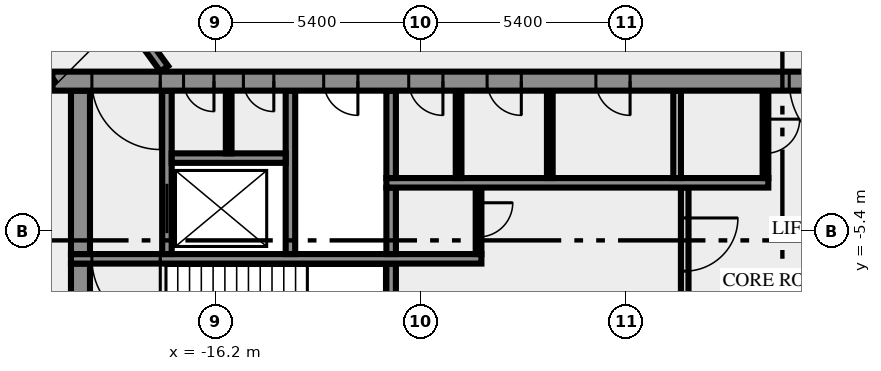
"""IFC4 building model, lengths in metres.
Left out: names, types, materials, properties, quantities, classifications, styles, units other than length and angle.
Written with IfcOpenShell. Run it as: python <this file> out.ifc"""

import sys

from ifc_helpers import new_model, si_unit, direction, frame, frame_2d, origin, place, context, subcontext, project, spatial, rectangle, extrude, element, fill, save


model = new_model("IFC4")
c1 = context("Model", 3, precision=1e-05, world=origin(), true_north=direction((0.0, 1.0)))
c2 = subcontext(c1, "Body", "Model", "MODEL_VIEW")
j1 = project(units=[si_unit("LENGTHUNIT", "METRE"), si_unit("PLANEANGLEUNIT", "RADIAN")], contexts=[c1])
p1 = place(None, origin())
s1 = spatial("IfcSite", under=j1, at=p1, CompositionType="ELEMENT")
p2 = place(p1, origin())
s2 = spatial("IfcBuilding", under=s1, at=p2, CompositionType="ELEMENT")
p3 = place(p2, frame((0.0, 0.0, 206.0)))
s3 = spatial("IfcBuildingStorey", under=s2, at=p3, CompositionType="ELEMENT", Elevation=206.0)
p4 = place(p3, frame((-19.75, -10.5, 0.0), z_axis=(0.0, 0.0, 1.0), x_axis=(0.0, 1.0, 0.0)))
e1 = element("IfcWall", 1, at=p4, inside=s3, PredefinedType="SHEAR", context=c2, shape_type="SweptSolid", body=[
    extrude(rectangle(XDim=4.25, YDim=0.5, at=frame_2d((2.125, 0.0))), origin(), (0.0, 0.0, 1.0), 3.65),
])
p5 = place(p3, frame((-11.575, -7.25, 0.0), z_axis=(0.0, 0.0, 1.0), x_axis=(0.0, 1.0, 0.0)))
e2 = element("IfcWall", 2, at=p5, inside=s3, PredefinedType="SHEAR", context=c2, shape_type="SweptSolid", body=[
    extrude(rectangle(XDim=1.0, YDim=0.25, at=frame_2d((0.5, 0.0))), origin(), (0.0, 0.0, 1.0), 3.65),
])
p6 = place(p3, frame((-3.85, -4.25, 0.0), z_axis=(0.0, 0.0, 1.0), x_axis=(0.0, -1.0, 0.0)))
e3 = element("IfcWall", 3, at=p6, inside=s3, PredefinedType="SOLIDWALL", context=c2, shape_type="SweptSolid", body=[
    extrude(rectangle(XDim=3.0, YDim=0.2, at=frame_2d((1.5, 0.0))), origin(), (0.0, 0.0, 1.0), 3.65),
])
p7 = place(p6, frame((0.8, 0.0, 0.0)))
e4 = element("IfcOpeningElement", 4, at=p7, cuts=e3, PredefinedType="OPENING", context=c2, shape_type="SweptSolid", body=[
    extrude(rectangle(XDim=1.4, YDim=2.1, at=frame_2d((0.7, 1.05))), frame((0.0, 0.11, 0.0), z_axis=(0.0, -1.0, 0.0), x_axis=(1.0, 0.0, 0.0)), (0.0, 0.0, 1.0), 0.22),
])
p8 = place(p3, frame((-9.2, -6.125, 0.0), z_axis=(0.0, 0.0, 1.0), x_axis=(-1.0, 0.0, 0.0)))
e5 = element("IfcWall", 5, at=p8, inside=s3, PredefinedType="SHEAR", context=c2, shape_type="SweptSolid", body=[
    extrude(rectangle(XDim=10.8, YDim=0.25, at=frame_2d((5.4, 0.0))), origin(), (0.0, 0.0, 1.0), 3.65),
])
p9 = place(p8, frame((8.45, 0.0, 0.0)))
e6 = element("IfcOpeningElement", 6, at=p9, cuts=e5, PredefinedType="OPENING", context=c2, shape_type="SweptSolid", body=[
    extrude(rectangle(XDim=1.8, YDim=2.1, at=frame_2d((0.9, 1.05))), frame((0.0, 0.135, 0.0), z_axis=(0.0, -1.0, 0.0), x_axis=(1.0, 0.0, 0.0)), (0.0, 0.0, 1.0), 0.27),
])
p10 = place(p3, frame((-19.75, -6.0, 0.0), z_axis=(0.0, 0.0, 1.0), x_axis=(0.0, 1.0, 0.0)))
e7 = element("IfcWall", 7, at=p10, inside=s3, PredefinedType="SHEAR", context=c2, shape_type="SweptSolid", body=[
    extrude(rectangle(XDim=4.3, YDim=0.5, at=frame_2d((2.15, 0.0))), origin(), (0.0, 0.0, 1.0), 3.65),
])
p11 = place(p3, frame((-17.475, -6.0, 0.0), z_axis=(0.0, 0.0, 1.0), x_axis=(0.0, 1.0, 0.0)))
e8 = element("IfcWall", 8, at=p11, inside=s3, PredefinedType="SHEAR", context=c2, shape_type="SweptSolid", body=[
    extrude(rectangle(XDim=4.3, YDim=0.25, at=frame_2d((2.15, 0.0))), origin(), (0.0, 0.0, 1.0), 3.65),
])
p12 = place(p11, frame((0.55, 0.0, 0.0)))
e9 = element("IfcOpeningElement", 9, at=p12, cuts=e8, PredefinedType="OPENING", context=c2, shape_type="SweptSolid", body=[
    extrude(rectangle(XDim=1.3, YDim=2.1, at=frame_2d((0.65, 1.05))), frame((0.0, 0.135, 0.0), z_axis=(0.0, -1.0, 0.0), x_axis=(1.0, 0.0, 0.0)), (0.0, 0.0, 1.0), 0.27),
])
p13 = place(p3, frame((-14.225, -6.0, 0.0), z_axis=(0.0, 0.0, 1.0), x_axis=(0.0, 1.0, 0.0)))
e10 = element("IfcWall", 10, at=p13, inside=s3, PredefinedType="SHEAR", context=c2, shape_type="SweptSolid", body=[
    extrude(rectangle(XDim=4.3, YDim=0.25, at=frame_2d((2.15, 0.0))), origin(), (0.0, 0.0, 1.0), 3.65),
])
p14 = place(p3, frame((-11.575, -6.0, 0.0), z_axis=(0.0, 0.0, 1.0), x_axis=(0.0, 1.0, 0.0)))
e11 = element("IfcWall", 11, at=p14, inside=s3, PredefinedType="SHEAR", context=c2, shape_type="SweptSolid", body=[
    extrude(rectangle(XDim=1.75, YDim=0.25, at=frame_2d((0.875, 0.0))), origin(), (0.0, 0.0, 1.0), 3.65),
])
p15 = place(p3, frame((-9.275, -4.25, 0.0), z_axis=(0.0, 0.0, 1.0), x_axis=(0.0, -1.0, 0.0)))
e12 = element("IfcWall", 12, at=p15, inside=s3, PredefinedType="PARTITIONING", context=c2, shape_type="SweptSolid", body=[
    extrude(rectangle(XDim=1.75, YDim=0.15, at=frame_2d((0.875, 0.0))), origin(), (0.0, 0.0, 1.0), 3.65),
])
p16 = place(p15, frame((0.4, 0.0, 0.0)))
e13 = element("IfcOpeningElement", 13, at=p16, cuts=e12, PredefinedType="OPENING", context=c2, shape_type="SweptSolid", body=[
    extrude(rectangle(XDim=0.9, YDim=2.1, at=frame_2d((0.45, 1.05))), frame((0.0, 0.085, 0.0), z_axis=(0.0, -1.0, 0.0), x_axis=(1.0, 0.0, 0.0)), (0.0, 0.0, 1.0), 0.17),
])
p17 = place(p3, frame((-11.7, -4.125, 0.0), z_axis=(0.0, 0.0, 1.0), x_axis=(1.0, 0.0, 0.0)))
e14 = element("IfcWall", 14, at=p17, inside=s3, PredefinedType="SHEAR", context=c2, shape_type="SweptSolid", body=[
    extrude(rectangle(XDim=10.05, YDim=0.25, at=frame_2d((5.025, 0.0))), origin(), (0.0, 0.0, 1.0), 3.65),
])
p18 = place(p3, frame((-11.575, -4.0, 0.0), z_axis=(0.0, 0.0, 1.0), x_axis=(0.0, 1.0, 0.0)))
e15 = element("IfcWall", 15, at=p18, inside=s3, PredefinedType="SHEAR", context=c2, shape_type="SweptSolid", body=[
    extrude(rectangle(XDim=2.3, YDim=0.25, at=frame_2d((1.15, 0.0))), origin(), (0.0, 0.0, 1.0), 3.65),
])
for number, where, z_axis, x_axis in (
    (16, (-9.8, -4.0, 0.0), (0.0, 0.0, 1.0), (0.0, 1.0, 0.0)),
    (17, (-7.4, -4.0, 0.0), (0.0, 0.0, 1.0), (0.0, 1.0, 0.0)),
):
    element("IfcWall", number, at=place(p3, frame(where, z_axis=z_axis, x_axis=x_axis)), inside=s3, PredefinedType="PARTITIONING", context=c2, shape_type="SweptSolid", body=[
        extrude(rectangle(XDim=2.3, YDim=0.15, at=frame_2d((1.15, 0.0))), origin(), (0.0, 0.0, 1.0), 3.65),
    ])
p19 = place(p3, frame((-4.05, -4.0, 0.0), z_axis=(0.0, 0.0, 1.0), x_axis=(0.0, 1.0, 0.0)))
e18 = element("IfcWall", 18, at=p19, inside=s3, PredefinedType="SOLIDWALL", context=c2, shape_type="SweptSolid", body=[
    extrude(rectangle(XDim=2.3, YDim=0.2, at=frame_2d((1.15, 0.0))), origin(), (0.0, 0.0, 1.0), 3.65),
])
p20 = place(p3, frame((-1.725, -1.7, 0.0), z_axis=(0.0, 0.0, 1.0), x_axis=(0.0, -1.0, 0.0)))
e19 = element("IfcWall", 19, at=p20, inside=s3, PredefinedType="PARTITIONING", context=c2, shape_type="SweptSolid", body=[
    extrude(rectangle(XDim=2.3, YDim=0.15, at=frame_2d((1.15, 0.0))), origin(), (0.0, 0.0, 1.0), 3.65),
])
p21 = place(p20, frame((0.75, 0.0, 0.0)))
e20 = element("IfcOpeningElement", 20, at=p21, cuts=e19, PredefinedType="OPENING", context=c2, shape_type="SweptSolid", body=[
    extrude(rectangle(XDim=0.9, YDim=2.1, at=frame_2d((0.45, 1.05))), frame((0.0, 0.085, 0.0), z_axis=(0.0, -1.0, 0.0), x_axis=(1.0, 0.0, 0.0)), (0.0, 0.0, 1.0), 0.17),
])
p22 = place(p3, frame((-17.35, -3.475, 0.0), z_axis=(0.0, 0.0, 1.0), x_axis=(1.0, 0.0, 0.0)))
e21 = element("IfcWall", 21, at=p22, inside=s3, PredefinedType="SHEAR", context=c2, shape_type="SweptSolid", body=[
    extrude(rectangle(XDim=3.0, YDim=0.25, at=frame_2d((1.5, 0.0))), origin(), (0.0, 0.0, 1.0), 3.65),
])
p23 = place(p3, frame((-15.85, -3.35, 0.0), z_axis=(0.0, 0.0, 1.0), x_axis=(0.0, 1.0, 0.0)))
e22 = element("IfcWall", 22, at=p23, inside=s3, PredefinedType="PARTITIONING", context=c2, shape_type="SweptSolid", body=[
    extrude(rectangle(XDim=1.65, YDim=0.15, at=frame_2d((0.825, 0.0))), origin(), (0.0, 0.0, 1.0), 3.65),
])
p24 = place(p3, frame((20.49, -1.45, 0.0), z_axis=(0.0, 0.0, 1.0), x_axis=(-1.0, 0.0, 0.0)))
e23 = element("IfcWall", 23, at=p24, inside=s3, PredefinedType="SHEAR", context=c2, shape_type="SweptSolid", body=[
    extrude(rectangle(XDim=40.98, YDim=0.5, at=frame_2d((20.49, 0.0))), origin(), (0.0, 0.0, 1.0), 3.65),
])
p25 = place(p24, frame((38.14, 0.0, 0.0)))
e24 = element("IfcOpeningElement", 24, at=p25, cuts=e23, PredefinedType="OPENING", context=c2, shape_type="SweptSolid", body=[
    extrude(rectangle(XDim=1.8, YDim=2.1, at=frame_2d((0.9, 1.05))), frame((0.0, 0.26, 0.0), z_axis=(0.0, -1.0, 0.0), x_axis=(1.0, 0.0, 0.0)), (0.0, 0.0, 1.0), 0.52),
])
p26 = place(p24, frame((36.728, 0.0, 0.0)))
e25 = element("IfcOpeningElement", 25, at=p26, cuts=e23, PredefinedType="OPENING", context=c2, shape_type="SweptSolid", body=[
    extrude(rectangle(XDim=0.8, YDim=2.1, at=frame_2d((0.4, 1.05))), frame((0.0, 0.26, 0.0), z_axis=(0.0, -1.0, 0.0), x_axis=(1.0, 0.0, 0.0)), (0.0, 0.0, 1.0), 0.52),
])
p27 = place(p24, frame((35.153, 0.0, 0.0)))
e26 = element("IfcOpeningElement", 26, at=p27, cuts=e23, PredefinedType="OPENING", context=c2, shape_type="SweptSolid", body=[
    extrude(rectangle(XDim=0.8, YDim=2.1, at=frame_2d((0.4, 1.05))), frame((0.0, 0.26, 0.0), z_axis=(0.0, -1.0, 0.0), x_axis=(1.0, 0.0, 0.0)), (0.0, 0.0, 1.0), 0.52),
])
p28 = place(p24, frame((32.94, 0.0, 0.0)))
e27 = element("IfcOpeningElement", 27, at=p28, cuts=e23, PredefinedType="OPENING", context=c2, shape_type="SweptSolid", body=[
    extrude(rectangle(XDim=0.9, YDim=2.1, at=frame_2d((0.45, 1.05))), frame((0.0, 0.26, 0.0), z_axis=(0.0, -1.0, 0.0), x_axis=(1.0, 0.0, 0.0)), (0.0, 0.0, 1.0), 0.52),
])
p29 = place(p24, frame((30.702, 0.0, 0.0)))
e28 = element("IfcOpeningElement", 28, at=p29, cuts=e23, PredefinedType="OPENING", context=c2, shape_type="SweptSolid", body=[
    extrude(rectangle(XDim=0.9, YDim=2.1, at=frame_2d((0.45, 1.05))), frame((0.0, 0.26, 0.0), z_axis=(0.0, -1.0, 0.0), x_axis=(1.0, 0.0, 0.0)), (0.0, 0.0, 1.0), 0.52),
])
p30 = place(p24, frame((28.64, 0.0, 0.0)))
e29 = element("IfcOpeningElement", 29, at=p30, cuts=e23, PredefinedType="OPENING", context=c2, shape_type="SweptSolid", body=[
    extrude(rectangle(XDim=0.9, YDim=2.1, at=frame_2d((0.45, 1.05))), frame((0.0, 0.26, 0.0), z_axis=(0.0, -1.0, 0.0), x_axis=(1.0, 0.0, 0.0)), (0.0, 0.0, 1.0), 0.52),
])
p31 = place(p24, frame((25.778, 0.0, 0.0)))
e30 = element("IfcOpeningElement", 30, at=p31, cuts=e23, PredefinedType="OPENING", context=c2, shape_type="SweptSolid", body=[
    extrude(rectangle(XDim=0.9, YDim=2.1, at=frame_2d((0.45, 1.05))), frame((0.0, 0.26, 0.0), z_axis=(0.0, -1.0, 0.0), x_axis=(1.0, 0.0, 0.0)), (0.0, 0.0, 1.0), 0.52),
])
p32 = place(p24, frame((19.59, 0.0, 0.0)))
e31 = element("IfcOpeningElement", 31, at=p32, cuts=e23, PredefinedType="OPENING", context=c2, shape_type="SweptSolid", body=[
    extrude(rectangle(XDim=2.0, YDim=2.1, at=frame_2d((1.0, 1.05))), frame((0.0, 0.26, 0.0), z_axis=(0.0, -1.0, 0.0), x_axis=(1.0, 0.0, 0.0)), (0.0, 0.0, 1.0), 0.52),
])
p33 = place(p24, frame((7.14, 0.0, 0.0)))
e32 = element("IfcOpeningElement", 32, at=p33, cuts=e23, PredefinedType="OPENING", context=c2, shape_type="SweptSolid", body=[
    extrude(rectangle(XDim=0.9, YDim=2.1, at=frame_2d((0.45, 1.05))), frame((0.0, 0.26, 0.0), z_axis=(0.0, -1.0, 0.0), x_axis=(1.0, 0.0, 0.0)), (0.0, 0.0, 1.0), 0.52),
])
p34 = place(p24, frame((4.19, 0.0, 0.0)))
e33 = element("IfcOpeningElement", 33, at=p34, cuts=e23, PredefinedType="OPENING", context=c2, shape_type="SweptSolid", body=[
    extrude(rectangle(XDim=0.9, YDim=2.1, at=frame_2d((0.45, 1.05))), frame((0.0, 0.26, 0.0), z_axis=(0.0, -1.0, 0.0), x_axis=(1.0, 0.0, 0.0)), (0.0, 0.0, 1.0), 0.52),
])
p35 = place(p24, frame((1.04, 0.0, 0.0)))
e34 = element("IfcOpeningElement", 34, at=p35, cuts=e23, PredefinedType="OPENING", context=c2, shape_type="SweptSolid", body=[
    extrude(rectangle(XDim=1.8, YDim=2.1, at=frame_2d((0.9, 1.05))), frame((0.0, 0.26, 0.0), z_axis=(0.0, -1.0, 0.0), x_axis=(1.0, 0.0, 0.0)), (0.0, 0.0, 1.0), 0.52),
])
p36 = place(p3, frame((-20.531, -1.523, 0.0), z_axis=(0.0, 0.0, 1.0), x_axis=(-0.587784239999, 0.809017729849, 0.0)))
e35 = element("IfcWall", 35, at=p36, inside=s3, PredefinedType="SOLIDWALL", context=c2, shape_type="SweptSolid", body=[
    extrude(rectangle(XDim=23.271, YDim=0.25, at=frame_2d((11.635, 0.0))), origin(), (0.0, 0.0, 1.0), 3.65),
])
p37 = place(p36, frame((16.716, 0.0, 0.0)))
e36 = element("IfcOpeningElement", 36, at=p37, cuts=e35, PredefinedType="OPENING", context=c2, shape_type="SweptSolid", body=[
    extrude(rectangle(XDim=1.2, YDim=2.1, at=frame_2d((0.6, 1.05))), frame((0.0, 0.135, 0.0), z_axis=(0.0, -1.0, 0.0), x_axis=(1.0, 0.0, 0.0)), (0.0, 0.0, 1.0), 0.27),
])
p38 = place(p36, frame((18.616, 0.0, 0.0)))
e37 = element("IfcOpeningElement", 37, at=p38, cuts=e35, PredefinedType="OPENING", context=c2, shape_type="SweptSolid", body=[
    extrude(rectangle(XDim=0.9, YDim=2.1, at=frame_2d((0.45, 1.05))), frame((0.0, 0.135, 0.0), z_axis=(0.0, -1.0, 0.0), x_axis=(1.0, 0.0, 0.0)), (0.0, 0.0, 1.0), 0.27),
])
p39 = place(p3, frame((-31.918, 18.658, 0.0), z_axis=(0.0, 0.0, 1.0), x_axis=(0.587788731405, -0.80901446664, 0.0)))
e38 = element("IfcWall", 38, at=p39, inside=s3, PredefinedType="SOLIDWALL", context=c2, shape_type="SweptSolid", body=[
    extrude(rectangle(XDim=24.453, YDim=0.25, at=frame_2d((12.227, 0.0))), origin(), (0.0, 0.0, 1.0), 3.65),
])
p40 = place(p39, frame((20.112, 0.0, 0.0)))
e39 = element("IfcOpeningElement", 39, at=p40, cuts=e38, PredefinedType="OPENING", context=c2, shape_type="SweptSolid", body=[
    extrude(rectangle(XDim=0.9, YDim=2.1, at=frame_2d((0.45, 1.05))), frame((0.0, 0.135, 0.0), z_axis=(0.0, -1.0, 0.0), x_axis=(1.0, 0.0, 0.0)), (0.0, 0.0, 1.0), 0.27),
])
p41 = place(p39, frame((4.445, 0.0, 0.0)))
e40 = element("IfcOpeningElement", 40, at=p41, cuts=e38, PredefinedType="OPENING", context=c2, shape_type="SweptSolid", body=[
    extrude(rectangle(XDim=0.9, YDim=2.1, at=frame_2d((0.45, 1.05))), frame((0.0, 0.135, 0.0), z_axis=(0.0, -1.0, 0.0), x_axis=(1.0, 0.0, 0.0)), (0.0, 0.0, 1.0), 0.27),
])
p42 = place(p7, origin())
e41 = element("IfcDoor", 41, at=p42, inside=s3, OperationType="DOUBLE_DOOR_SINGLE_SWING", PredefinedType="DOOR", context=c2, shape_type="SweptSolid", body=[
    extrude(rectangle(XDim=1.4, YDim=2.1, at=frame_2d((0.7, 1.05))), frame((0.0, 0.025, 0.0), z_axis=(0.0, -1.0, 0.0), x_axis=(1.0, 0.0, 0.0)), (0.0, 0.0, 1.0), 0.05),
])
fill(e4, e41)
p43 = place(p9, origin())
e42 = element("IfcDoor", 42, at=p43, inside=s3, OperationType="DOUBLE_DOOR_SINGLE_SWING", PredefinedType="DOOR", context=c2, shape_type="SweptSolid", body=[
    extrude(rectangle(XDim=1.8, YDim=2.1, at=frame_2d((0.9, 1.05))), frame((0.0, 0.025, 0.0), z_axis=(0.0, -1.0, 0.0), x_axis=(1.0, 0.0, 0.0)), (0.0, 0.0, 1.0), 0.05),
])
fill(e6, e42)
p44 = place(p12, origin())
e43 = element("IfcDoor", 43, at=p44, inside=s3, OperationType="DOUBLE_DOOR_SLIDING", PredefinedType="DOOR", context=c2, shape_type="SweptSolid", body=[
    extrude(rectangle(XDim=1.3, YDim=2.1, at=frame_2d((0.65, 1.05))), frame((0.0, 0.025, 0.0), z_axis=(0.0, -1.0, 0.0), x_axis=(1.0, 0.0, 0.0)), (0.0, 0.0, 1.0), 0.05),
])
fill(e9, e43)
p45 = place(p16, origin())
e44 = element("IfcDoor", 44, at=p45, inside=s3, OperationType="SINGLE_SWING_LEFT", PredefinedType="DOOR", context=c2, shape_type="SweptSolid", body=[
    extrude(rectangle(XDim=0.9, YDim=2.1, at=frame_2d((0.45, 1.05))), frame((0.0, 0.025, 0.0), z_axis=(0.0, -1.0, 0.0), x_axis=(1.0, 0.0, 0.0)), (0.0, 0.0, 1.0), 0.05),
])
fill(e13, e44)
p46 = place(p21, origin())
e45 = element("IfcDoor", 45, at=p46, inside=s3, OperationType="SINGLE_SWING_RIGHT", PredefinedType="DOOR", context=c2, shape_type="SweptSolid", body=[
    extrude(rectangle(XDim=0.9, YDim=2.1, at=frame_2d((0.45, 1.05))), frame((0.0, 0.025, 0.0), z_axis=(0.0, -1.0, 0.0), x_axis=(1.0, 0.0, 0.0)), (0.0, 0.0, 1.0), 0.05),
])
fill(e20, e45)
p47 = place(p25, origin())
e46 = element("IfcDoor", 46, at=p47, inside=s3, OperationType="DOUBLE_DOOR_SINGLE_SWING", PredefinedType="DOOR", context=c2, shape_type="SweptSolid", body=[
    extrude(rectangle(XDim=1.8, YDim=2.1, at=frame_2d((0.9, 1.05))), frame((0.0, 0.025, 0.0), z_axis=(0.0, -1.0, 0.0), x_axis=(1.0, 0.0, 0.0)), (0.0, 0.0, 1.0), 0.05),
])
fill(e24, e46)
p48 = place(p26, origin())
e47 = element("IfcDoor", 47, at=p48, inside=s3, OperationType="SINGLE_SWING_RIGHT", PredefinedType="DOOR", context=c2, shape_type="SweptSolid", body=[
    extrude(rectangle(XDim=0.8, YDim=2.1, at=frame_2d((0.4, 1.05))), frame((0.0, 0.025, 0.0), z_axis=(0.0, -1.0, 0.0), x_axis=(1.0, 0.0, 0.0)), (0.0, 0.0, 1.0), 0.05),
])
fill(e25, e47)
p49 = place(p27, origin())
e48 = element("IfcDoor", 48, at=p49, inside=s3, OperationType="SINGLE_SWING_RIGHT", PredefinedType="DOOR", context=c2, shape_type="SweptSolid", body=[
    extrude(rectangle(XDim=0.8, YDim=2.1, at=frame_2d((0.4, 1.05))), frame((0.0, 0.025, 0.0), z_axis=(0.0, -1.0, 0.0), x_axis=(1.0, 0.0, 0.0)), (0.0, 0.0, 1.0), 0.05),
])
fill(e26, e48)
p50 = place(p28, origin())
e49 = element("IfcDoor", 49, at=p50, inside=s3, OperationType="SINGLE_SWING_RIGHT", PredefinedType="DOOR", context=c2, shape_type="SweptSolid", body=[
    extrude(rectangle(XDim=0.9, YDim=2.1, at=frame_2d((0.45, 1.05))), frame((0.0, 0.025, 0.0), z_axis=(0.0, -1.0, 0.0), x_axis=(1.0, 0.0, 0.0)), (0.0, 0.0, 1.0), 0.05),
])
fill(e27, e49)
p51 = place(p29, origin())
e50 = element("IfcDoor", 50, at=p51, inside=s3, OperationType="SINGLE_SWING_RIGHT", PredefinedType="DOOR", context=c2, shape_type="SweptSolid", body=[
    extrude(rectangle(XDim=0.9, YDim=2.1, at=frame_2d((0.45, 1.05))), frame((0.0, 0.025, 0.0), z_axis=(0.0, -1.0, 0.0), x_axis=(1.0, 0.0, 0.0)), (0.0, 0.0, 1.0), 0.05),
])
fill(e28, e50)
p52 = place(p30, origin())
e51 = element("IfcDoor", 51, at=p52, inside=s3, OperationType="SINGLE_SWING_RIGHT", PredefinedType="DOOR", context=c2, shape_type="SweptSolid", body=[
    extrude(rectangle(XDim=0.9, YDim=2.1, at=frame_2d((0.45, 1.05))), frame((0.0, 0.025, 0.0), z_axis=(0.0, -1.0, 0.0), x_axis=(1.0, 0.0, 0.0)), (0.0, 0.0, 1.0), 0.05),
])
fill(e29, e51)
p53 = place(p31, origin())
e52 = element("IfcDoor", 52, at=p53, inside=s3, OperationType="SINGLE_SWING_RIGHT", PredefinedType="DOOR", context=c2, shape_type="SweptSolid", body=[
    extrude(rectangle(XDim=0.9, YDim=2.1, at=frame_2d((0.45, 1.05))), frame((0.0, 0.025, 0.0), z_axis=(0.0, -1.0, 0.0), x_axis=(1.0, 0.0, 0.0)), (0.0, 0.0, 1.0), 0.05),
])
fill(e30, e52)
p54 = place(p32, origin())
e53 = element("IfcDoor", 53, at=p54, inside=s3, OperationType="DOUBLE_DOOR_SINGLE_SWING", PredefinedType="DOOR", context=c2, shape_type="SweptSolid", body=[
    extrude(rectangle(XDim=2.0, YDim=2.1, at=frame_2d((1.0, 1.05))), frame((0.0, 0.025, 0.0), z_axis=(0.0, -1.0, 0.0), x_axis=(1.0, 0.0, 0.0)), (0.0, 0.0, 1.0), 0.05),
])
fill(e31, e53)
save(model, sys.argv[1])
